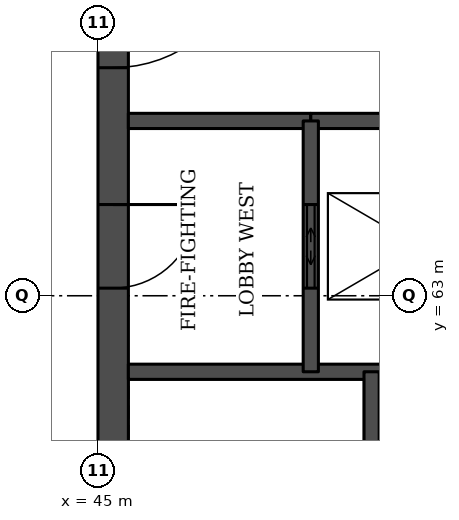
"""IFC4 building model, lengths in metres.
Left out: names, types, materials, properties, quantities, classifications, styles, units other than length and angle.
Written with IfcOpenShell. Run it as: python <this file> out.ifc"""

import sys

from ifc_helpers import new_model, si_unit, direction, frame, frame_2d, origin, place, context, subcontext, project, spatial, rectangle, extrude, element, fill, save


model = new_model("IFC4")
c1 = context("Model", 3, precision=1e-05, world=origin(), true_north=direction((0.0, 1.0)))
c2 = subcontext(c1, "Body", "Model", "MODEL_VIEW")
j1 = project(units=[si_unit("LENGTHUNIT", "METRE"), si_unit("PLANEANGLEUNIT", "RADIAN")], contexts=[c1])
p1 = place(None, origin())
s1 = spatial("IfcSite", under=j1, at=p1, CompositionType="ELEMENT")
p2 = place(p1, origin())
s2 = spatial("IfcBuilding", under=s1, at=p2, CompositionType="ELEMENT")
p3 = place(p2, frame((0.0, 0.0, 184.7)))
s3 = spatial("IfcBuildingStorey", under=s2, at=p3, CompositionType="ELEMENT", Elevation=184.7)
p4 = place(p3, frame((45.2, 49.5, 0.0), z_axis=(0.0, 0.0, 1.0), x_axis=(0.0, 1.0, 0.0)))
e1 = element("IfcWall", 1, at=p4, inside=s3, PredefinedType="SHEAR", context=c2, shape_type="SweptSolid", body=[
    extrude(rectangle(XDim=22.5, YDim=0.4, at=frame_2d((11.25, 0.0))), origin(), (0.0, 0.0, 1.0), 3.7),
])
p5 = place(p4, frame((4.2, 0.0, 0.0)))
e2 = element("IfcOpeningElement", 2, at=p5, cuts=e1, PredefinedType="OPENING", context=c2, shape_type="SweptSolid", body=[
    extrude(rectangle(XDim=1.8, YDim=2.1, at=frame_2d((0.9, 1.05))), frame((0.0, 0.21, 0.0), z_axis=(0.0, -1.0, 0.0), x_axis=(1.0, 0.0, 0.0)), (0.0, 0.0, 1.0), 0.42),
])
p6 = place(p4, frame((6.9, 0.0, 0.0)))
e3 = element("IfcOpeningElement", 3, at=p6, cuts=e1, PredefinedType="OPENING", context=c2, shape_type="SweptSolid", body=[
    extrude(rectangle(XDim=1.1, YDim=2.1, at=frame_2d((0.55, 1.05))), frame((0.0, 0.21, 0.0), z_axis=(0.0, -1.0, 0.0), x_axis=(1.0, 0.0, 0.0)), (0.0, 0.0, 1.0), 0.42),
])
p7 = place(p4, frame((13.6, 0.0, 0.0)))
e4 = element("IfcOpeningElement", 4, at=p7, cuts=e1, PredefinedType="OPENING", context=c2, shape_type="SweptSolid", body=[
    extrude(rectangle(XDim=1.1, YDim=2.1, at=frame_2d((0.55, 1.05))), frame((0.0, 0.21, 0.0), z_axis=(0.0, -1.0, 0.0), x_axis=(1.0, 0.0, 0.0)), (0.0, 0.0, 1.0), 0.42),
])
p8 = place(p4, frame((16.5, 0.0, 0.0)))
e5 = element("IfcOpeningElement", 5, at=p8, cuts=e1, PredefinedType="OPENING", context=c2, shape_type="SweptSolid", body=[
    extrude(rectangle(XDim=1.8, YDim=2.1, at=frame_2d((0.9, 1.05))), frame((0.0, 0.21, 0.0), z_axis=(0.0, -1.0, 0.0), x_axis=(1.0, 0.0, 0.0)), (0.0, 0.0, 1.0), 0.42),
])
p9 = place(p3, frame((45.4, 62.0, 0.0), z_axis=(0.0, 0.0, 1.0), x_axis=(1.0, 0.0, 0.0)))
e6 = element("IfcWall", 6, at=p9, inside=s3, PredefinedType="SOLIDWALL", context=c2, shape_type="SweptSolid", body=[
    extrude(rectangle(XDim=5.25, YDim=0.2, at=frame_2d((2.625, 0.0))), origin(), (0.0, 0.0, 1.0), 3.55),
])
p10 = place(p3, frame((45.4, 65.3, 0.0), z_axis=(0.0, 0.0, 1.0), x_axis=(1.0, 0.0, 0.0)))
e7 = element("IfcWall", 7, at=p10, inside=s3, PredefinedType="SOLIDWALL", context=c2, shape_type="SweptSolid", body=[
    extrude(rectangle(XDim=2.4, YDim=0.2, at=frame_2d((1.2, 0.0))), origin(), (0.0, 0.0, 1.0), 3.55),
])
p11 = place(p3, frame((47.8, 65.3, 0.0), z_axis=(0.0, 0.0, 1.0), x_axis=(1.0, 0.0, 0.0)))
e8 = element("IfcWall", 8, at=p11, inside=s3, PredefinedType="SOLIDWALL", context=c2, shape_type="SweptSolid", body=[
    extrude(rectangle(XDim=16.9, YDim=0.2, at=frame_2d((8.45, 0.0))), origin(), (0.0, 0.0, 1.0), 3.55),
])
p12 = place(p11, frame((3.65, 0.0, 0.0)))
e9 = element("IfcOpeningElement", 9, at=p12, cuts=e8, PredefinedType="OPENING", context=c2, shape_type="SweptSolid", body=[
    extrude(rectangle(XDim=1.2, YDim=2.1, at=frame_2d((0.6, 1.05))), frame((0.0, 0.11, 0.0), z_axis=(0.0, -1.0, 0.0), x_axis=(1.0, 0.0, 0.0)), (0.0, 0.0, 1.0), 0.22),
])
p13 = place(p11, frame((6.45, 0.0, 0.0)))
e10 = element("IfcOpeningElement", 10, at=p13, cuts=e8, PredefinedType="OPENING", context=c2, shape_type="SweptSolid", body=[
    extrude(rectangle(XDim=1.2, YDim=2.1, at=frame_2d((0.6, 1.05))), frame((0.0, 0.11, 0.0), z_axis=(0.0, -1.0, 0.0), x_axis=(1.0, 0.0, 0.0)), (0.0, 0.0, 1.0), 0.22),
])
p14 = place(p11, frame((9.25, 0.0, 0.0)))
e11 = element("IfcOpeningElement", 11, at=p14, cuts=e8, PredefinedType="OPENING", context=c2, shape_type="SweptSolid", body=[
    extrude(rectangle(XDim=1.2, YDim=2.1, at=frame_2d((0.6, 1.05))), frame((0.0, 0.11, 0.0), z_axis=(0.0, -1.0, 0.0), x_axis=(1.0, 0.0, 0.0)), (0.0, 0.0, 1.0), 0.22),
])
p15 = place(p11, frame((12.05, 0.0, 0.0)))
e12 = element("IfcOpeningElement", 12, at=p15, cuts=e8, PredefinedType="OPENING", context=c2, shape_type="SweptSolid", body=[
    extrude(rectangle(XDim=1.2, YDim=2.1, at=frame_2d((0.6, 1.05))), frame((0.0, 0.11, 0.0), z_axis=(0.0, -1.0, 0.0), x_axis=(1.0, 0.0, 0.0)), (0.0, 0.0, 1.0), 0.22),
])
p16 = place(p3, frame((47.8, 62.0, 0.0), z_axis=(0.0, 0.0, 1.0), x_axis=(0.0, 1.0, 0.0)))
e13 = element("IfcWall", 13, at=p16, inside=s3, PredefinedType="SOLIDWALL", context=c2, shape_type="SweptSolid", body=[
    extrude(rectangle(XDim=3.3, YDim=0.2, at=frame_2d((1.65, 0.0))), origin(), (0.0, 0.0, 1.0), 3.55),
])
p17 = place(p16, frame((1.1, 0.0, 0.0)))
e14 = element("IfcOpeningElement", 14, at=p17, cuts=e13, PredefinedType="OPENING", context=c2, shape_type="SweptSolid", body=[
    extrude(rectangle(XDim=1.1, YDim=2.1, at=frame_2d((0.55, 1.05))), frame((0.0, 0.11, 0.0), z_axis=(0.0, -1.0, 0.0), x_axis=(1.0, 0.0, 0.0)), (0.0, 0.0, 1.0), 0.22),
])
p18 = place(p3, frame((48.6, 56.2, 0.0), z_axis=(0.0, 0.0, 1.0), x_axis=(0.0, 1.0, 0.0)))
e15 = element("IfcWall", 15, at=p18, inside=s3, PredefinedType="SOLIDWALL", context=c2, shape_type="SweptSolid", body=[
    extrude(rectangle(XDim=5.8, YDim=0.2, at=frame_2d((2.9, 0.0))), origin(), (0.0, 0.0, 1.0), 3.55),
])
p19 = place(p17, origin())
e16 = element("IfcDoor", 16, at=p19, inside=s3, OperationType="DOUBLE_DOOR_SLIDING", PredefinedType="DOOR", context=c2, shape_type="SweptSolid", body=[
    extrude(rectangle(XDim=1.1, YDim=2.1, at=frame_2d((0.55, 1.05))), frame((0.0, 0.025, 0.0), z_axis=(0.0, -1.0, 0.0), x_axis=(1.0, 0.0, 0.0)), (0.0, 0.0, 1.0), 0.05),
])
fill(e14, e16)
p20 = place(p7, frame((1.1, 0.0, 0.0), z_axis=(0.0, 0.0, 1.0), x_axis=(-1.0, 0.0, 0.0)))
e17 = element("IfcDoor", 17, at=p20, inside=s3, OperationType="SINGLE_SWING_LEFT", PredefinedType="DOOR", context=c2, shape_type="SweptSolid", body=[
    extrude(rectangle(XDim=1.1, YDim=2.1, at=frame_2d((0.55, 1.05))), frame((0.0, 0.025, 0.0), z_axis=(0.0, -1.0, 0.0), x_axis=(1.0, 0.0, 0.0)), (0.0, 0.0, 1.0), 0.05),
])
fill(e4, e17)
p21 = place(p8, frame((1.8, 0.0, 0.0), z_axis=(0.0, 0.0, 1.0), x_axis=(-1.0, 0.0, 0.0)))
e18 = element("IfcDoor", 18, at=p21, inside=s3, OperationType="SINGLE_SWING_LEFT", PredefinedType="DOOR", context=c2, shape_type="SweptSolid", body=[
    extrude(rectangle(XDim=1.8, YDim=2.1, at=frame_2d((0.9, 1.05))), frame((0.0, 0.025, 0.0), z_axis=(0.0, -1.0, 0.0), x_axis=(1.0, 0.0, 0.0)), (0.0, 0.0, 1.0), 0.05),
])
fill(e5, e18)
save(model, sys.argv[1])
